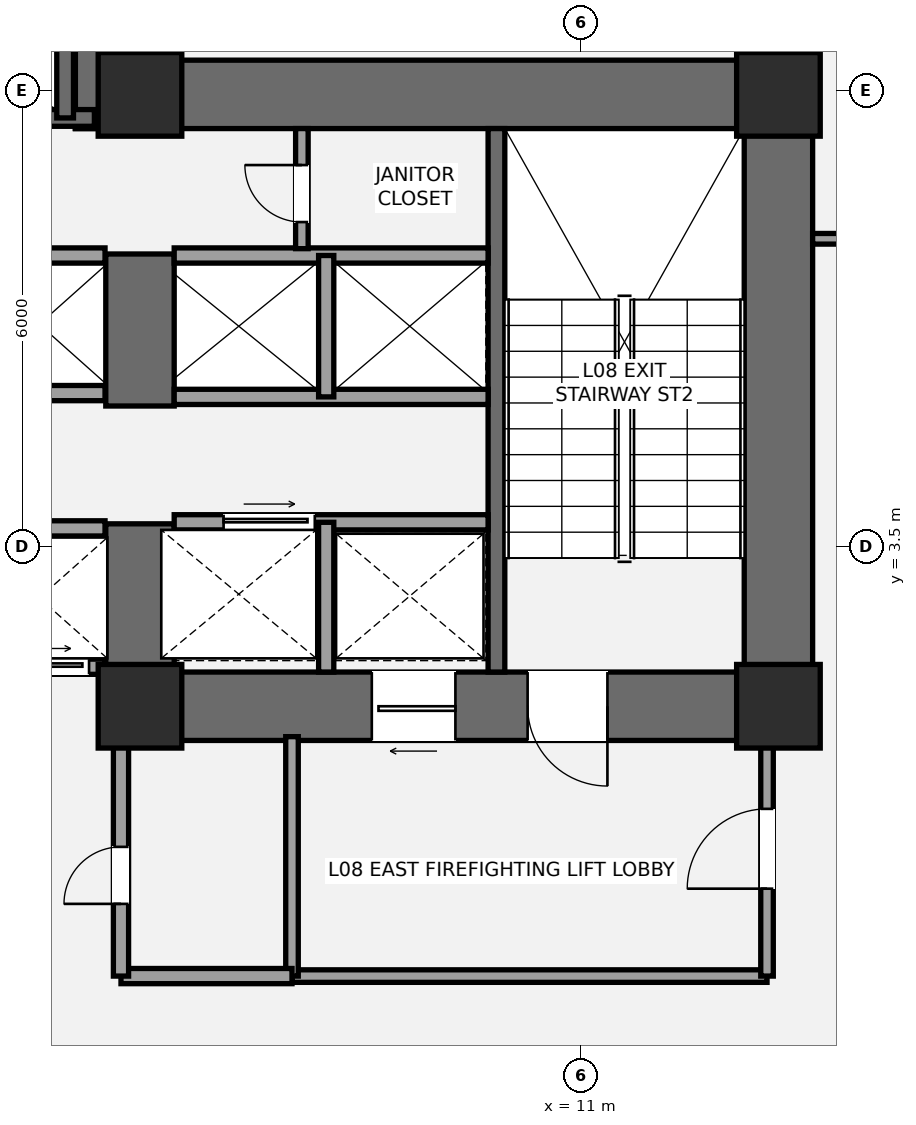
"""IFC4 building model, lengths in metres.
Left out: names, types, materials, properties, quantities, classifications, styles, units other than length and angle.
Written with IfcOpenShell. Run it as: python <this file> out.ifc"""

import sys

from ifc_helpers import new_model, si_unit, direction, frame, frame_2d, origin, origin_2d, place, context, subcontext, project, spatial, rectangle, extrude, element, fill, save


model = new_model("IFC4")
c1 = context("Model", 3, precision=1e-05, world=origin(), true_north=direction((0.0, 1.0)))
c2 = subcontext(c1, "Body", "Model", "MODEL_VIEW")
j1 = project(units=[si_unit("LENGTHUNIT", "METRE"), si_unit("PLANEANGLEUNIT", "RADIAN")], contexts=[c1])
p1 = place(None, origin())
s1 = spatial("IfcSite", under=j1, at=p1, CompositionType="ELEMENT")
p2 = place(p1, origin())
s2 = spatial("IfcBuilding", under=s1, at=p2, CompositionType="ELEMENT")
p3 = place(p2, frame((0.0, 0.0, 34.2)))
s3 = spatial("IfcBuildingStorey", under=s2, at=p3, CompositionType="ELEMENT", Elevation=34.2)
p4 = place(p3, frame((13.6, 0.95, 0.0), z_axis=(0.0, 0.0, 1.0), x_axis=(0.0, 1.0, 0.0)))
e1 = element("IfcWall", 1, at=p4, inside=s3, PredefinedType="SHEAR", context=c2, shape_type="SweptSolid", body=[
    extrude(rectangle(XDim=8.95, YDim=0.9, at=frame_2d((4.475, 0.0))), origin(), (0.0, 0.0, 1.0), 3.6),
])
p5 = place(p3, frame((4.35, 9.45, 0.0), z_axis=(0.0, 0.0, 1.0), x_axis=(1.0, 0.0, 0.0)))
e2 = element("IfcWall", 2, at=p5, inside=s3, PredefinedType="SHEAR", context=c2, shape_type="SweptSolid", body=[
    extrude(rectangle(XDim=9.7, YDim=0.9, at=frame_2d((4.85, 0.0))), origin(), (0.0, 0.0, 1.0), 3.6),
])
p6 = place(p3, frame((14.05, 1.4, 0.0), z_axis=(0.0, 0.0, 1.0), x_axis=(-1.0, 0.0, 0.0)))
e3 = element("IfcWall", 3, at=p6, inside=s3, PredefinedType="SHEAR", context=c2, shape_type="SweptSolid", body=[
    extrude(rectangle(XDim=9.3, YDim=0.9, at=frame_2d((4.65, 0.0))), origin(), (0.0, 0.0, 1.0), 3.6),
])
p7 = place(p6, frame((2.7, 0.0, 0.0)))
e4 = element("IfcOpeningElement", 4, at=p7, cuts=e3, PredefinedType="OPENING", context=c2, shape_type="SweptSolid", body=[
    extrude(rectangle(XDim=1.05, YDim=2.15, at=frame_2d((0.525, 1.075))), frame((0.0, 0.46, 0.0), z_axis=(0.0, -1.0, 0.0), x_axis=(1.0, 0.0, 0.0)), (0.0, 0.0, 1.0), 0.92),
])
p8 = place(p6, frame((4.7, 0.0, 0.0)))
e5 = element("IfcOpeningElement", 5, at=p8, cuts=e3, PredefinedType="OPENING", context=c2, shape_type="SweptSolid", body=[
    extrude(rectangle(XDim=1.1, YDim=2.2, at=frame_2d((0.55, 1.1))), frame((0.0, 0.46, 0.0), z_axis=(0.0, -1.0, 0.0), x_axis=(1.0, 0.0, 0.0)), (0.0, 0.0, 1.0), 0.92),
])
p9 = place(p3, frame((5.2, 0.95, 0.0), z_axis=(0.0, 0.0, 1.0), x_axis=(0.0, 1.0, 0.0)))
e6 = element("IfcWall", 6, at=p9, inside=s3, PredefinedType="SHEAR", context=c2, shape_type="SweptSolid", body=[
    extrude(rectangle(XDim=2.85, YDim=0.9, at=frame_2d((1.425, 0.0))), origin(), (0.0, 0.0, 1.0), 3.6),
])
p10 = place(p3, frame((5.2, 5.35, 0.0), z_axis=(0.0, 0.0, 1.0), x_axis=(0.0, 1.0, 0.0)))
e7 = element("IfcWall", 7, at=p10, inside=s3, PredefinedType="SHEAR", context=c2, shape_type="SweptSolid", body=[
    extrude(rectangle(XDim=2.0, YDim=0.9, at=frame_2d((1.0, 0.0))), origin(), (0.0, 0.0, 1.0), 3.6),
])
p11 = place(p3, frame((9.89, 1.85, 0.0), z_axis=(0.0, 0.0, 1.0), x_axis=(0.0, 1.0, 0.0)))
e8 = element("IfcWall", 8, at=p11, inside=s3, PredefinedType="SHEAR", context=c2, shape_type="SweptSolid", body=[
    extrude(rectangle(XDim=7.15, YDim=0.22, at=frame_2d((3.575, 0.0))), origin(), (0.0, 0.0, 1.0), 3.6),
])
p12 = place(p3, frame((4.8, 9.0, 0.0), z_axis=(0.0, 0.0, 1.0), x_axis=(0.0, 1.0, 0.0)))
e9 = element("IfcWall", 9, at=p12, inside=s3, PredefinedType="SHEAR", context=c2, shape_type="SweptSolid", body=[
    extrude(rectangle(XDim=4.3, YDim=0.9, at=frame_2d((2.15, 0.0))), origin(), (0.0, 0.0, 1.0), 3.6),
])
p13 = place(p3, frame((-4.7, 9.14, 0.0), z_axis=(0.0, 0.0, 1.0), x_axis=(1.0, 0.0, 0.0)))
e10 = element("IfcWall", 10, at=p13, inside=s3, PredefinedType="SHEAR", context=c2, shape_type="SweptSolid", body=[
    extrude(rectangle(XDim=9.3, YDim=0.22, at=frame_2d((4.65, 0.0))), origin(), (0.0, 0.0, 1.0), 3.6),
])
p14 = place(p13, frame((1.15, 0.0, 0.0)))
e11 = element("IfcOpeningElement", 11, at=p14, cuts=e10, PredefinedType="OPENING", context=c2, shape_type="SweptSolid", body=[
    extrude(rectangle(XDim=1.05, YDim=2.15, at=frame_2d((0.525, 1.075))), frame((0.0, 0.12, 0.0), z_axis=(0.0, -1.0, 0.0), x_axis=(1.0, 0.0, 0.0)), (0.0, 0.0, 1.0), 0.24),
])
p15 = place(p3, frame((4.215, 9.14, 0.0), z_axis=(0.0, 0.0, 1.0), x_axis=(0.0, 1.0, 0.0)))
e12 = element("IfcWall", 12, at=p15, inside=s3, PredefinedType="SHEAR", context=c2, shape_type="SweptSolid", body=[
    extrude(rectangle(XDim=3.26, YDim=0.22, at=frame_2d((1.63, 0.0))), origin(), (0.0, 0.0, 1.0), 3.6),
])
for number, where, z_axis, x_axis in (
    (13, (5.2, 1.4, 0.0), (0.0, 0.0, 1.0), (1.0, 0.0, 0.0)),
    (14, (5.2, 9.45, 0.0), (0.0, 0.0, 1.0), (1.0, 0.0, 0.0)),
    (15, (13.6, 1.4, 0.0), (0.0, 0.0, 1.0), (1.0, 0.0, 0.0)),
    (16, (13.6, 9.45, 0.0), (0.0, 0.0, 1.0), (1.0, 0.0, 0.0)),
):
    element("IfcColumn", number, at=place(p3, frame(where, z_axis=z_axis, x_axis=x_axis)), inside=s3, PredefinedType="COLUMN", context=c2, shape_type="SweptSolid", body=[
        extrude(rectangle(XDim=1.1, YDim=1.1, at=origin_2d()), origin(), (0.0, 0.0, 1.0), 3.6),
    ])
p16 = place(p3, frame((7.2, -2.15, 0.0), z_axis=(0.0, 0.0, 1.0), x_axis=(1.0, 0.0, 0.0)))
e17 = element("IfcWall", 17, at=p16, inside=s3, PredefinedType="PARTITIONING", context=c2, shape_type="SweptSolid", body=[
    extrude(rectangle(XDim=6.25, YDim=0.165, at=frame_2d((3.125, 0.0))), origin(), (0.0, 0.0, 1.0), 3.4),
])
p17 = place(p3, frame((7.2, -2.15, 0.0), z_axis=(0.0, 0.0, 1.0), x_axis=(0.0, 1.0, 0.0)))
e18 = element("IfcWall", 18, at=p17, inside=s3, PredefinedType="PARTITIONING", context=c2, shape_type="SweptSolid", body=[
    extrude(rectangle(XDim=3.15, YDim=0.165, at=frame_2d((1.575, 0.0))), origin(), (0.0, 0.0, 1.0), 2.853),
])
p18 = place(p3, frame((13.45, -2.15, 0.0), z_axis=(0.0, 0.0, 1.0), x_axis=(0.0, 1.0, 0.0)))
e19 = element("IfcWall", 19, at=p18, inside=s3, PredefinedType="PARTITIONING", context=c2, shape_type="SweptSolid", body=[
    extrude(rectangle(XDim=3.15, YDim=0.165, at=frame_2d((1.575, 0.0))), origin(), (0.0, 0.0, 1.0), 2.853),
])
p19 = place(p18, frame((1.15, 0.0, 0.0)))
e20 = element("IfcOpeningElement", 20, at=p19, cuts=e19, PredefinedType="OPENING", context=c2, shape_type="SweptSolid", body=[
    extrude(rectangle(XDim=1.05, YDim=2.15, at=frame_2d((0.525, 1.075))), frame((0.0, 0.093, 0.0), z_axis=(0.0, -1.0, 0.0), x_axis=(1.0, 0.0, 0.0)), (0.0, 0.0, 1.0), 0.185),
])
p20 = place(p3, frame((4.95, -2.15, 0.0), z_axis=(0.0, 0.0, 1.0), x_axis=(1.0, 0.0, 0.0)))
e21 = element("IfcWall", 21, at=p20, inside=s3, PredefinedType="SOLIDWALL", context=c2, shape_type="SweptSolid", body=[
    extrude(rectangle(XDim=2.25, YDim=0.2, at=frame_2d((1.125, 0.0))), origin(), (0.0, 0.0, 1.0), 3.4),
])
p21 = place(p3, frame((4.95, -2.15, 0.0), z_axis=(0.0, 0.0, 1.0), x_axis=(0.0, 1.0, 0.0)))
e22 = element("IfcWall", 22, at=p21, inside=s3, PredefinedType="SOLIDWALL", context=c2, shape_type="SweptSolid", body=[
    extrude(rectangle(XDim=3.15, YDim=0.2, at=frame_2d((1.575, 0.0))), origin(), (0.0, 0.0, 1.0), 2.853),
])
p22 = place(p21, frame((0.95, 0.0, 0.0)))
e23 = element("IfcOpeningElement", 23, at=p22, cuts=e22, PredefinedType="OPENING", context=c2, shape_type="SweptSolid", body=[
    extrude(rectangle(XDim=0.75, YDim=2.1, at=frame_2d((0.375, 1.05))), frame((0.0, 0.11, 0.0), z_axis=(0.0, -1.0, 0.0), x_axis=(1.0, 0.0, 0.0)), (0.0, 0.0, 1.0), 0.22),
])
p23 = place(p3, frame((5.65, 3.82, 0.0), z_axis=(0.0, 0.0, 1.0), x_axis=(1.0, 0.0, 0.0)))
e24 = element("IfcWall", 24, at=p23, inside=s3, PredefinedType="SOLIDWALL", context=c2, shape_type="SweptSolid", body=[
    extrude(rectangle(XDim=4.13, YDim=0.2, at=frame_2d((2.065, 0.0))), origin(), (0.0, 0.0, 1.0), 3.4),
])
p24 = place(p23, frame((0.65, 0.0, 0.0)))
e25 = element("IfcOpeningElement", 25, at=p24, cuts=e24, PredefinedType="OPENING", context=c2, shape_type="SweptSolid", body=[
    extrude(rectangle(XDim=1.2, YDim=2.2, at=frame_2d((0.6, 1.1))), frame((0.0, 0.11, 0.0), z_axis=(0.0, -1.0, 0.0), x_axis=(1.0, 0.0, 0.0)), (0.0, 0.0, 1.0), 0.22),
])
p25 = place(p3, frame((7.65, 1.85, 0.0), z_axis=(0.0, 0.0, 1.0), x_axis=(0.0, 1.0, 0.0)))
e26 = element("IfcWall", 26, at=p25, inside=s3, PredefinedType="SOLIDWALL", context=c2, shape_type="SweptSolid", body=[
    extrude(rectangle(XDim=1.97, YDim=0.2, at=frame_2d((0.985, 0.0))), origin(), (0.0, 0.0, 1.0), 3.4),
])
for number, where, z_axis, x_axis in (
    (27, (5.65, 5.47, 0.0), (0.0, 0.0, 1.0), (1.0, 0.0, 0.0)),
    (28, (5.65, 7.33, 0.0), (0.0, 0.0, 1.0), (1.0, 0.0, 0.0)),
):
    element("IfcWall", number, at=place(p3, frame(where, z_axis=z_axis, x_axis=x_axis)), inside=s3, PredefinedType="SOLIDWALL", context=c2, shape_type="SweptSolid", body=[
        extrude(rectangle(XDim=4.13, YDim=0.2, at=frame_2d((2.065, 0.0))), origin(), (0.0, 0.0, 1.0), 3.4),
    ])
p26 = place(p3, frame((7.65, 5.47, 0.0), z_axis=(0.0, 0.0, 1.0), x_axis=(0.0, 1.0, 0.0)))
e29 = element("IfcWall", 29, at=p26, inside=s3, PredefinedType="SOLIDWALL", context=c2, shape_type="SweptSolid", body=[
    extrude(rectangle(XDim=1.86, YDim=0.2, at=frame_2d((0.93, 0.0))), origin(), (0.0, 0.0, 1.0), 3.4),
])
p27 = place(p3, frame((0.88, 1.92, 0.0), z_axis=(0.0, 0.0, 1.0), x_axis=(1.0, 0.0, 0.0)))
e30 = element("IfcWall", 30, at=p27, inside=s3, PredefinedType="SOLIDWALL", context=c2, shape_type="SweptSolid", body=[
    extrude(rectangle(XDim=3.86, YDim=0.2, at=frame_2d((1.93, 0.0))), origin(), (0.0, 0.0, 1.0), 2.39),
])
p28 = place(p27, frame((0.55, 0.0, 0.0)))
e31 = element("IfcOpeningElement", 31, at=p28, cuts=e30, PredefinedType="OPENING", context=c2, shape_type="SweptSolid", body=[
    extrude(rectangle(XDim=1.1, YDim=2.2, at=frame_2d((0.55, 1.1))), frame((0.0, 0.11, 0.0), z_axis=(0.0, -1.0, 0.0), x_axis=(1.0, 0.0, 0.0)), (0.0, 0.0, 1.0), 0.22),
])
p29 = place(p27, frame((2.55, 0.0, 0.0)))
e32 = element("IfcOpeningElement", 32, at=p29, cuts=e30, PredefinedType="OPENING", context=c2, shape_type="SweptSolid", body=[
    extrude(rectangle(XDim=1.1, YDim=2.2, at=frame_2d((0.55, 1.1))), frame((0.0, 0.11, 0.0), z_axis=(0.0, -1.0, 0.0), x_axis=(1.0, 0.0, 0.0)), (0.0, 0.0, 1.0), 0.22),
])
for number, where, z_axis, x_axis in (
    (33, (0.88, 3.74, 0.0), (0.0, 0.0, 1.0), (1.0, 0.0, 0.0)),
    (34, (0.88, 5.52, 0.0), (0.0, 0.0, 1.0), (1.0, 0.0, 0.0)),
    (35, (0.88, 7.33, 0.0), (0.0, 0.0, 1.0), (1.0, 0.0, 0.0)),
):
    element("IfcWall", number, at=place(p3, frame(where, z_axis=z_axis, x_axis=x_axis)), inside=s3, PredefinedType="SOLIDWALL", context=c2, shape_type="SweptSolid", body=[
        extrude(rectangle(XDim=3.86, YDim=0.2, at=frame_2d((1.93, 0.0))), origin(), (0.0, 0.0, 1.0), 3.4),
    ])
p30 = place(p3, frame((7.33, 7.42, 0.0), z_axis=(0.0, 0.0, 1.0), x_axis=(0.0, 1.0, 0.0)))
e36 = element("IfcWall", 36, at=p30, inside=s3, PredefinedType="PARTITIONING", context=c2, shape_type="SweptSolid", body=[
    extrude(rectangle(XDim=1.58, YDim=0.165, at=frame_2d((0.79, 0.0))), origin(), (0.0, 0.0, 1.0), 3.4),
])
p31 = place(p30, frame((0.35, 0.0, 0.0)))
e37 = element("IfcOpeningElement", 37, at=p31, cuts=e36, PredefinedType="OPENING", context=c2, shape_type="SweptSolid", body=[
    extrude(rectangle(XDim=0.75, YDim=2.1, at=frame_2d((0.375, 1.05))), frame((0.0, 0.093, 0.0), z_axis=(0.0, -1.0, 0.0), x_axis=(1.0, 0.0, 0.0)), (0.0, 0.0, 1.0), 0.185),
])
p32 = place(p3, frame((14.05, 7.55, 0.0), z_axis=(0.0, 0.0, 1.0), x_axis=(1.0, 0.0, 0.0)))
e38 = element("IfcWall", 38, at=p32, inside=s3, PredefinedType="PARTITIONING", context=c2, shape_type="SweptSolid", body=[
    extrude(rectangle(XDim=9.774, YDim=0.14, at=frame_2d((4.887, 0.0))), origin(), (0.0, 0.0, 1.0), 2.853),
])
p33 = place(p32, frame((1.2, 0.0, 0.0)))
e39 = element("IfcOpeningElement", 39, at=p33, cuts=e38, PredefinedType="OPENING", context=c2, shape_type="SweptSolid", body=[
    extrude(rectangle(XDim=0.92, YDim=2.15, at=frame_2d((0.46, 1.075))), frame((0.0, 0.08, 0.0), z_axis=(0.0, -1.0, 0.0), x_axis=(1.0, 0.0, 0.0)), (0.0, 0.0, 1.0), 0.16),
])
p34 = place(p7, origin())
e40 = element("IfcDoor", 40, at=p34, inside=s3, OperationType="SINGLE_SWING_LEFT", PredefinedType="DOOR", context=c2, shape_type="SweptSolid", body=[
    extrude(rectangle(XDim=1.05, YDim=2.15, at=frame_2d((0.525, 1.075))), frame((0.0, 0.025, 0.0), z_axis=(0.0, -1.0, 0.0), x_axis=(1.0, 0.0, 0.0)), (0.0, 0.0, 1.0), 0.05),
])
fill(e4, e40)
p35 = place(p19, origin())
e41 = element("IfcDoor", 41, at=p35, inside=s3, OperationType="SINGLE_SWING_LEFT", PredefinedType="DOOR", context=c2, shape_type="SweptSolid", body=[
    extrude(rectangle(XDim=1.05, YDim=2.15, at=frame_2d((0.525, 1.075))), frame((0.0, 0.025, 0.0), z_axis=(0.0, -1.0, 0.0), x_axis=(1.0, 0.0, 0.0)), (0.0, 0.0, 1.0), 0.05),
])
fill(e20, e41)
p36 = place(p22, origin())
e42 = element("IfcDoor", 42, at=p36, inside=s3, OperationType="SINGLE_SWING_LEFT", PredefinedType="DOOR", context=c2, shape_type="SweptSolid", body=[
    extrude(rectangle(XDim=0.75, YDim=2.1, at=frame_2d((0.375, 1.05))), frame((0.0, 0.025, 0.0), z_axis=(0.0, -1.0, 0.0), x_axis=(1.0, 0.0, 0.0)), (0.0, 0.0, 1.0), 0.05),
])
fill(e23, e42)
p37 = place(p8, origin())
e43 = element("IfcDoor", 43, at=p37, inside=s3, OperationType="SLIDING_TO_LEFT", PredefinedType="DOOR", context=c2, shape_type="SweptSolid", body=[
    extrude(rectangle(XDim=1.1, YDim=2.2, at=frame_2d((0.55, 1.1))), frame((0.0, 0.025, 0.0), z_axis=(0.0, -1.0, 0.0), x_axis=(1.0, 0.0, 0.0)), (0.0, 0.0, 1.0), 0.05),
])
fill(e5, e43)
p38 = place(p24, origin())
e44 = element("IfcDoor", 44, at=p38, inside=s3, OperationType="SLIDING_TO_RIGHT", PredefinedType="DOOR", context=c2, shape_type="SweptSolid", body=[
    extrude(rectangle(XDim=1.2, YDim=2.2, at=frame_2d((0.6, 1.1))), frame((0.0, 0.025, 0.0), z_axis=(0.0, -1.0, 0.0), x_axis=(1.0, 0.0, 0.0)), (0.0, 0.0, 1.0), 0.05),
])
fill(e25, e44)
p39 = place(p29, origin())
e45 = element("IfcDoor", 45, at=p39, inside=s3, OperationType="SLIDING_TO_LEFT", PredefinedType="DOOR", context=c2, shape_type="SweptSolid", body=[
    extrude(rectangle(XDim=1.1, YDim=2.2, at=frame_2d((0.55, 1.1))), frame((0.0, 0.025, 0.0), z_axis=(0.0, -1.0, 0.0), x_axis=(1.0, 0.0, 0.0)), (0.0, 0.0, 1.0), 0.05),
])
fill(e32, e45)
p40 = place(p31, origin())
e46 = element("IfcDoor", 46, at=p40, inside=s3, OperationType="SINGLE_SWING_RIGHT", PredefinedType="DOOR", context=c2, shape_type="SweptSolid", body=[
    extrude(rectangle(XDim=0.75, YDim=2.1, at=frame_2d((0.375, 1.05))), frame((0.0, 0.025, 0.0), z_axis=(0.0, -1.0, 0.0), x_axis=(1.0, 0.0, 0.0)), (0.0, 0.0, 1.0), 0.05),
])
fill(e37, e46)
save(model, sys.argv[1])
